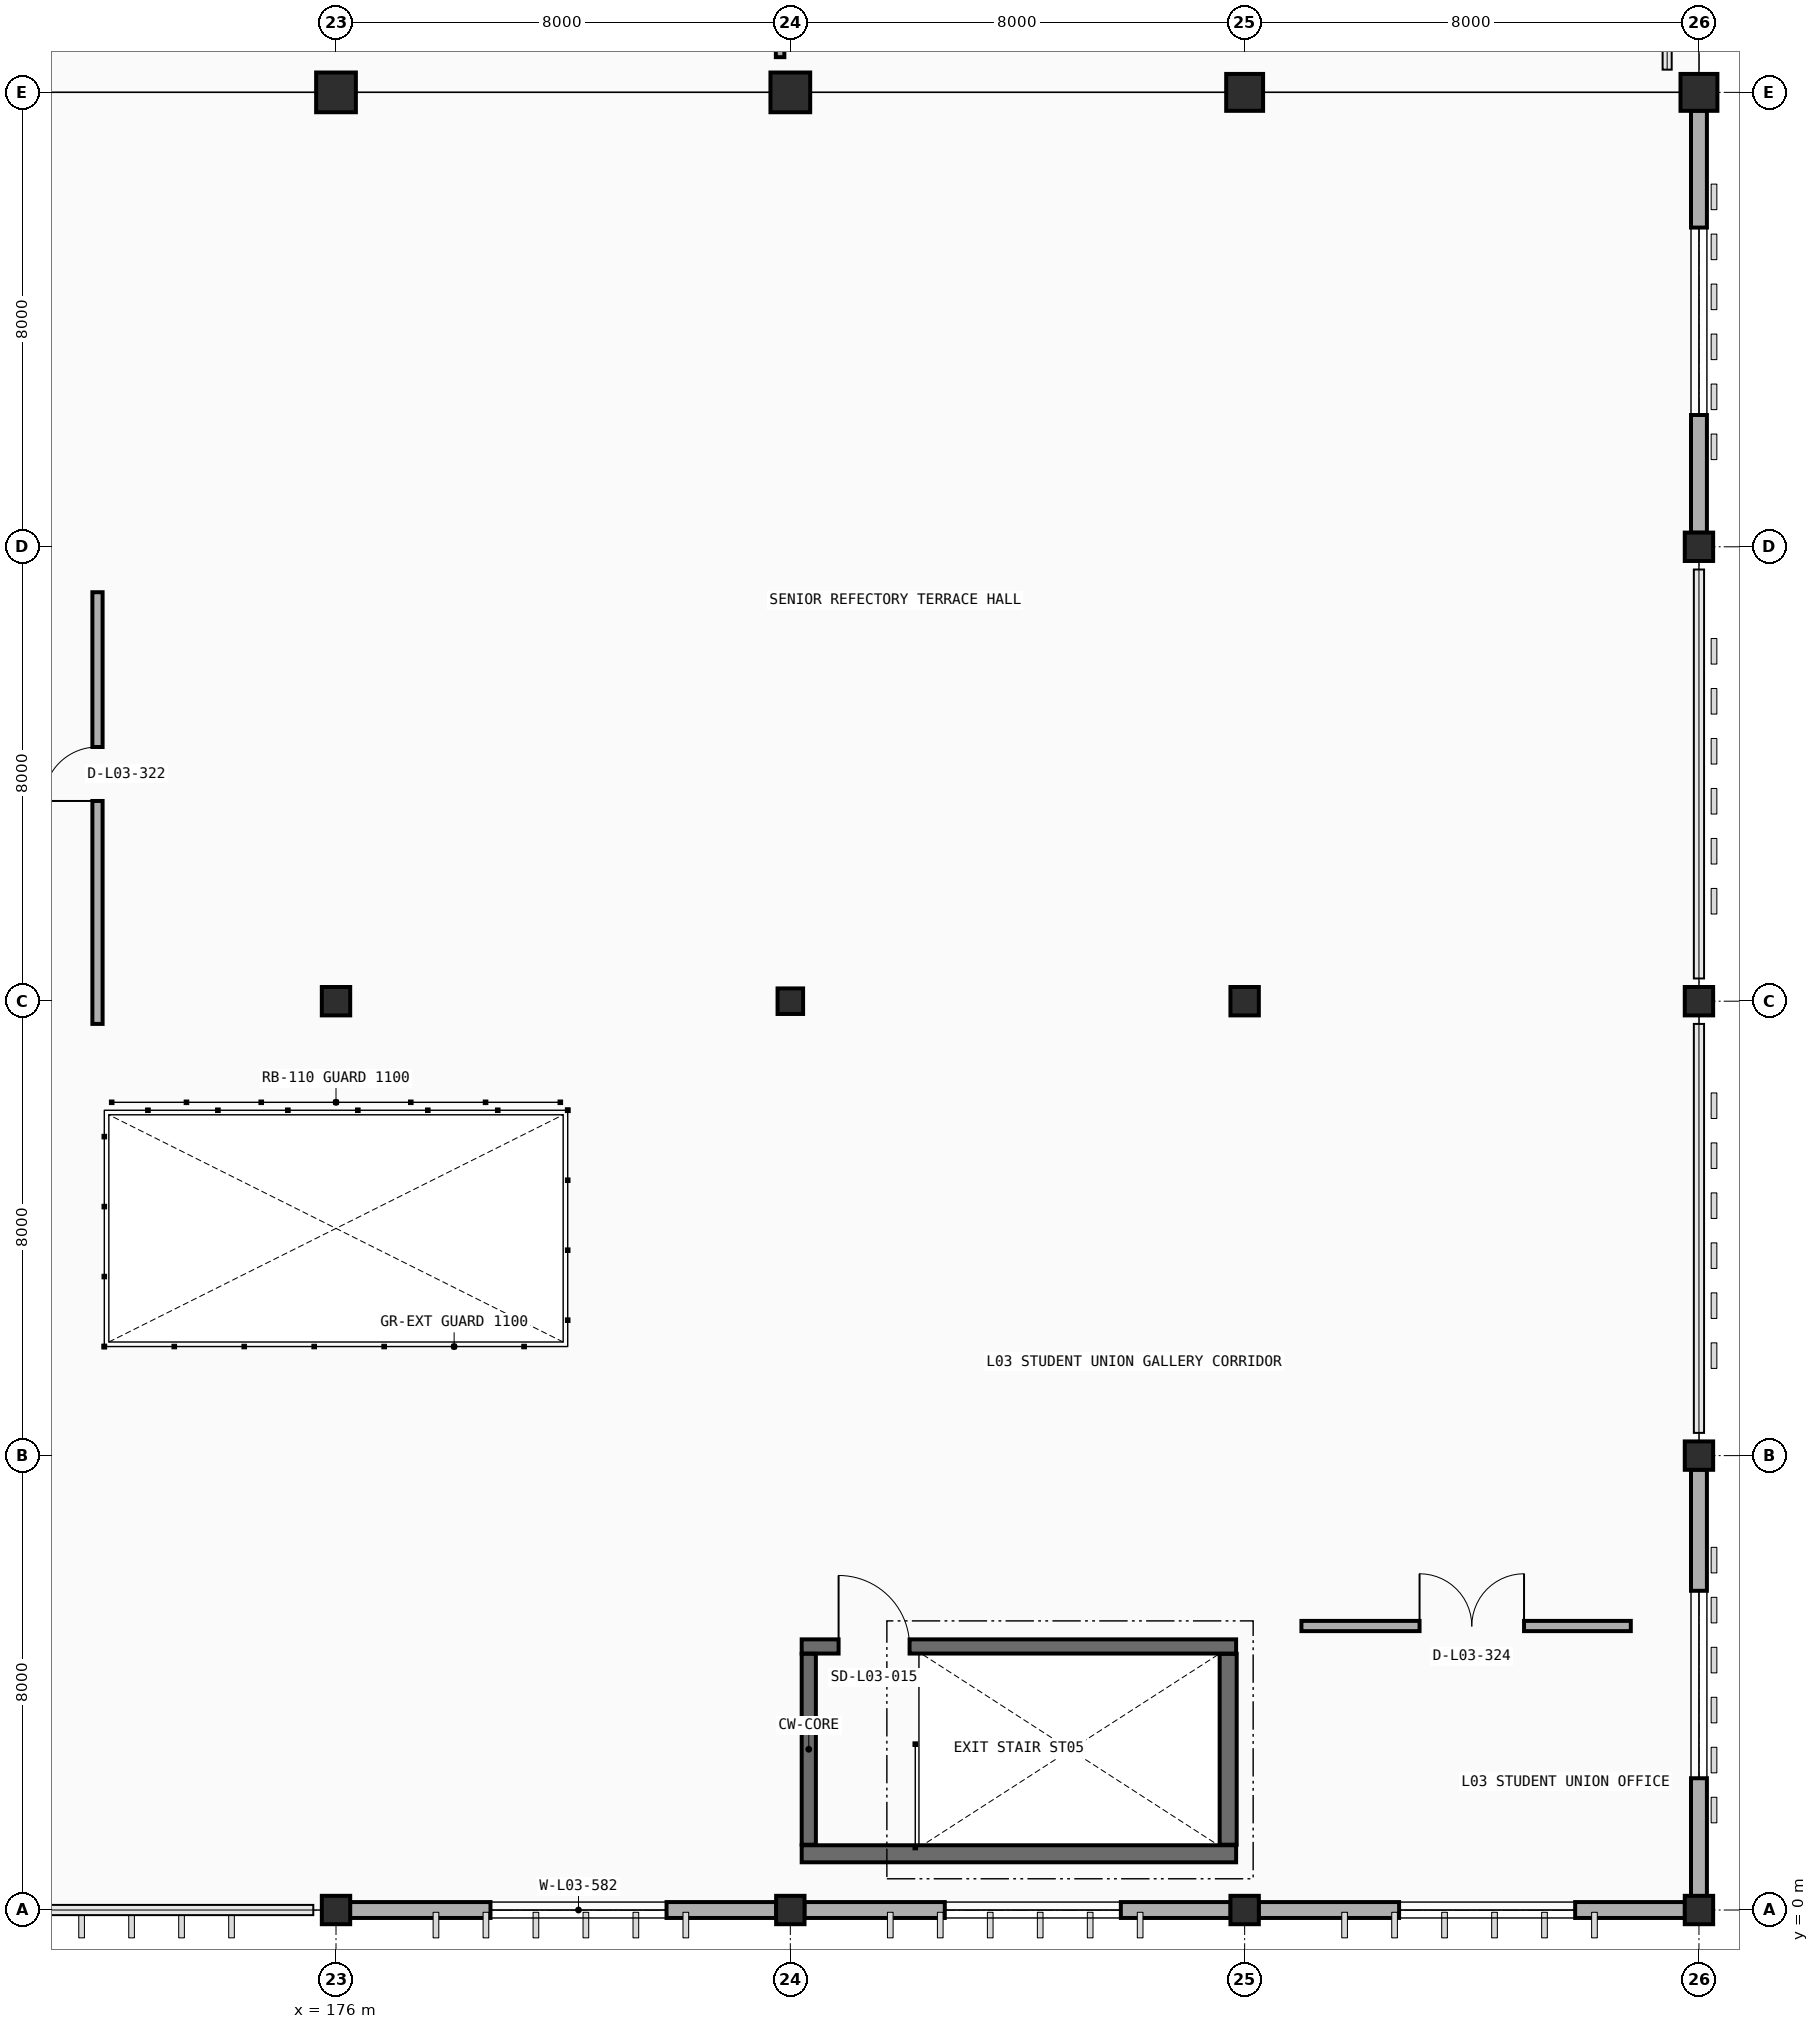
"""IFC4 building model, lengths in metres.
Left out: names, types, materials, properties, quantities, classifications, styles, units other than length and angle.
Written with IfcOpenShell. Run it as: python <this file> out.ifc"""

import sys

from ifc_helpers import new_model, si_unit, direction, frame, frame_2d, origin, origin_2d, place, context, subcontext, project, spatial, rectangle, extrude, element, fill, save


model = new_model("IFC4")
c1 = context("Model", 3, precision=1e-05, world=origin(), true_north=direction((0.0, 1.0)))
c2 = subcontext(c1, "Body", "Model", "MODEL_VIEW")
j1 = project(units=[si_unit("LENGTHUNIT", "METRE"), si_unit("PLANEANGLEUNIT", "RADIAN")], contexts=[c1])
p1 = place(None, origin())
s1 = spatial("IfcSite", under=j1, at=p1, CompositionType="ELEMENT")
p2 = place(p1, origin())
s2 = spatial("IfcBuilding", under=s1, at=p2, CompositionType="ELEMENT")
p3 = place(p2, frame((0.0, 0.0, 9.6)))
s3 = spatial("IfcBuildingStorey", under=s2, at=p3, CompositionType="ELEMENT", Elevation=9.6)
for number, where, z_axis, x_axis in (
    (1, (176.0, 0.0, 0.0), (0.0, 0.0, 1.0), (0.0, 1.0, 0.0)),
    (2, (184.0, 0.0, 0.0), (0.0, 0.0, 1.0), (0.0, 1.0, 0.0)),
    (3, (192.0, 0.0, 0.0), (0.0, 0.0, 1.0), (0.0, 1.0, 0.0)),
    (4, (200.0, 0.0, 0.0), (0.0, 0.0, 1.0), (0.0, 1.0, 0.0)),
    (5, (200.0, 8.0, 0.0), (0.0, 0.0, 1.0), (0.0, 1.0, 0.0)),
    (6, (176.0, 16.0, 0.0), (0.0, 0.0, 1.0), (1.0, 0.0, 0.0)),
):
    element("IfcColumn", number, at=place(p3, frame(where, z_axis=z_axis, x_axis=x_axis)), inside=s3, PredefinedType="COLUMN", context=c2, shape_type="SweptSolid", body=[
        extrude(rectangle(XDim=0.5, YDim=0.5, at=origin_2d()), origin(), (0.0, 0.0, 1.0), 4.2),
    ])
p4 = place(p3, frame((184.0, 16.0, 0.0), z_axis=(0.0, 0.0, 1.0), x_axis=(1.0, 0.0, 0.0)))
e7 = element("IfcColumn", 7, at=p4, inside=s3, PredefinedType="COLUMN", context=c2, shape_type="SweptSolid", body=[
    extrude(rectangle(XDim=0.45, YDim=0.45, at=origin_2d()), origin(), (0.0, 0.0, 1.0), 4.2),
])
for number, where, z_axis, x_axis in (
    (8, (192.0, 16.0, 0.0), (0.0, 0.0, 1.0), (1.0, 0.0, 0.0)),
    (9, (200.0, 16.0, 0.0), (0.0, 0.0, 1.0), (0.0, 1.0, 0.0)),
    (10, (200.0, 24.0, 0.0), (0.0, 0.0, 1.0), (0.0, 1.0, 0.0)),
):
    element("IfcColumn", number, at=place(p3, frame(where, z_axis=z_axis, x_axis=x_axis)), inside=s3, PredefinedType="COLUMN", context=c2, shape_type="SweptSolid", body=[
        extrude(rectangle(XDim=0.5, YDim=0.5, at=origin_2d()), origin(), (0.0, 0.0, 1.0), 4.2),
    ])
for number, where, z_axis, x_axis in (
    (11, (176.0, 32.0, 0.0), (0.0, 0.0, 1.0), (1.0, 0.0, 0.0)),
    (12, (184.0, 32.0, 0.0), (0.0, 0.0, 1.0), (1.0, 0.0, 0.0)),
):
    element("IfcColumn", number, at=place(p3, frame(where, z_axis=z_axis, x_axis=x_axis)), inside=s3, PredefinedType="COLUMN", context=c2, shape_type="SweptSolid", body=[
        extrude(rectangle(XDim=0.7, YDim=0.7, at=origin_2d()), origin(), (0.0, 0.0, 1.0), 4.2),
    ])
for number, where, z_axis, x_axis in (
    (13, (192.0, 32.0, 0.0), (0.0, 0.0, 1.0), (1.0, 0.0, 0.0)),
    (14, (200.0, 32.0, 0.0), (0.0, 0.0, 1.0), (1.0, 0.0, 0.0)),
):
    element("IfcColumn", number, at=place(p3, frame(where, z_axis=z_axis, x_axis=x_axis)), inside=s3, PredefinedType="COLUMN", context=c2, shape_type="SweptSolid", body=[
        extrude(rectangle(XDim=0.65, YDim=0.65, at=origin_2d()), origin(), (0.0, 0.0, 1.0), 4.2),
    ])
p5 = place(p3, frame((199.76, 32.22, 0.0), z_axis=(0.0, 0.0, 1.0), x_axis=(-1.0, 0.0, 0.0)))
e15 = element("IfcWall", 15, at=p5, inside=s3, PredefinedType="PARAPET", context=c2, shape_type="SweptSolid", body=[
    extrude(rectangle(XDim=0.32, YDim=0.2, at=frame_2d((0.16, 0.0))), origin(), (0.0, 0.0, 1.0), 3.35),
])
p6 = place(p3, frame((183.753, 0.0, 0.0), z_axis=(0.0, 0.0, 1.0), x_axis=(-1.0, 0.0, 0.0)))
e16 = element("IfcWall", 16, at=p6, inside=s3, PredefinedType="STANDARD", context=c2, shape_type="SweptSolid", body=[
    extrude(rectangle(XDim=7.506, YDim=0.28, at=frame_2d((3.753, 0.0))), origin(), (0.0, 0.0, 1.0), 3.35),
])
p7 = place(p6, frame((1.933, 0.0, 0.9)))
e17 = element("IfcOpeningElement", 17, at=p7, cuts=e16, PredefinedType="OPENING", context=c2, shape_type="SweptSolid", body=[
    extrude(rectangle(XDim=3.1, YDim=1.6, at=frame_2d((1.55, 0.8))), frame((0.0, 0.15, 0.0), z_axis=(0.0, -1.0, 0.0), x_axis=(1.0, 0.0, 0.0)), (0.0, 0.0, 1.0), 0.3),
])
p8 = place(p3, frame((191.753, 0.0, 0.0), z_axis=(0.0, 0.0, 1.0), x_axis=(-1.0, 0.0, 0.0)))
e18 = element("IfcWall", 18, at=p8, inside=s3, PredefinedType="STANDARD", context=c2, shape_type="SweptSolid", body=[
    extrude(rectangle(XDim=7.506, YDim=0.28, at=frame_2d((3.753, 0.0))), origin(), (0.0, 0.0, 1.0), 3.35),
])
p9 = place(p8, frame((1.933, 0.0, 0.9)))
e19 = element("IfcOpeningElement", 19, at=p9, cuts=e18, PredefinedType="OPENING", context=c2, shape_type="SweptSolid", body=[
    extrude(rectangle(XDim=3.1, YDim=1.6, at=frame_2d((1.55, 0.8))), frame((0.0, 0.15, 0.0), z_axis=(0.0, -1.0, 0.0), x_axis=(1.0, 0.0, 0.0)), (0.0, 0.0, 1.0), 0.3),
])
p10 = place(p3, frame((199.753, 0.0, 0.0), z_axis=(0.0, 0.0, 1.0), x_axis=(-1.0, 0.0, 0.0)))
e20 = element("IfcWall", 20, at=p10, inside=s3, PredefinedType="STANDARD", context=c2, shape_type="SweptSolid", body=[
    extrude(rectangle(XDim=7.506, YDim=0.28, at=frame_2d((3.753, 0.0))), origin(), (0.0, 0.0, 1.0), 3.35),
])
p11 = place(p10, frame((1.933, 0.0, 0.9)))
e21 = element("IfcOpeningElement", 21, at=p11, cuts=e20, PredefinedType="OPENING", context=c2, shape_type="SweptSolid", body=[
    extrude(rectangle(XDim=3.1, YDim=1.6, at=frame_2d((1.55, 0.8))), frame((0.0, 0.15, 0.0), z_axis=(0.0, -1.0, 0.0), x_axis=(1.0, 0.0, 0.0)), (0.0, 0.0, 1.0), 0.3),
])
p12 = place(p3, frame((200.0, 7.753, 0.0), z_axis=(0.0, 0.0, 1.0), x_axis=(0.0, -1.0, 0.0)))
e22 = element("IfcWall", 22, at=p12, inside=s3, PredefinedType="STANDARD", context=c2, shape_type="SweptSolid", body=[
    extrude(rectangle(XDim=7.506, YDim=0.28, at=frame_2d((3.753, 0.0))), origin(), (0.0, 0.0, 1.0), 3.35),
])
p13 = place(p12, frame((2.133, 0.0, 0.95)))
e23 = element("IfcOpeningElement", 23, at=p13, cuts=e22, PredefinedType="OPENING", context=c2, shape_type="SweptSolid", body=[
    extrude(rectangle(XDim=3.3, YDim=1.75, at=frame_2d((1.65, 0.875))), frame((0.0, 0.15, 0.0), z_axis=(0.0, -1.0, 0.0), x_axis=(1.0, 0.0, 0.0)), (0.0, 0.0, 1.0), 0.3),
])
p14 = place(p3, frame((200.0, 31.678, 0.0), z_axis=(0.0, 0.0, 1.0), x_axis=(0.0, -1.0, 0.0)))
e24 = element("IfcWall", 24, at=p14, inside=s3, PredefinedType="STANDARD", context=c2, shape_type="SweptSolid", body=[
    extrude(rectangle(XDim=7.431, YDim=0.28, at=frame_2d((3.715, 0.0))), origin(), (0.0, 0.0, 1.0), 3.35),
])
p15 = place(p14, frame((2.058, 0.0, 0.95)))
e25 = element("IfcOpeningElement", 25, at=p15, cuts=e24, PredefinedType="OPENING", context=c2, shape_type="SweptSolid", body=[
    extrude(rectangle(XDim=3.3, YDim=1.75, at=frame_2d((1.65, 0.875))), frame((0.0, 0.15, 0.0), z_axis=(0.0, -1.0, 0.0), x_axis=(1.0, 0.0, 0.0)), (0.0, 0.0, 1.0), 0.3),
])
p16 = place(p3, frame((184.2, 0.99, 0.0), z_axis=(0.0, 0.0, 1.0), x_axis=(1.0, 0.0, 0.0)))
e26 = element("IfcWall", 26, at=p16, inside=s3, PredefinedType="SHEAR", context=c2, shape_type="SweptSolid", body=[
    extrude(rectangle(XDim=7.65, YDim=0.3, at=frame_2d((3.825, 0.0))), origin(), (0.0, 0.0, 1.0), 4.2),
])
p17 = place(p3, frame((191.71, 1.15, 0.0), z_axis=(0.0, 0.0, 1.0), x_axis=(0.0, 1.0, 0.0)))
e27 = element("IfcWall", 27, at=p17, inside=s3, PredefinedType="SHEAR", context=c2, shape_type="SweptSolid", body=[
    extrude(rectangle(XDim=3.36, YDim=0.3, at=frame_2d((1.68, 0.0))), origin(), (0.0, 0.0, 1.0), 4.2),
])
p18 = place(p3, frame((184.2, 4.64, 0.0), z_axis=(0.0, 0.0, 1.0), x_axis=(1.0, 0.0, 0.0)))
e28 = element("IfcWall", 28, at=p18, inside=s3, PredefinedType="SOLIDWALL", context=c2, shape_type="SweptSolid", body=[
    extrude(rectangle(XDim=7.65, YDim=0.25, at=frame_2d((3.825, 0.0))), origin(), (0.0, 0.0, 1.0), 4.2),
])
p19 = place(p18, frame((0.65, 0.0, 0.0)))
e29 = element("IfcOpeningElement", 29, at=p19, cuts=e28, PredefinedType="OPENING", context=c2, shape_type="SweptSolid", body=[
    extrude(rectangle(XDim=1.25, YDim=2.15, at=frame_2d((0.625, 1.075))), frame((0.0, 0.135, 0.0), z_axis=(0.0, -1.0, 0.0), x_axis=(1.0, 0.0, 0.0)), (0.0, 0.0, 1.0), 0.27),
])
p20 = place(p3, frame((184.325, 1.15, 0.0), z_axis=(0.0, 0.0, 1.0), x_axis=(0.0, 1.0, 0.0)))
e30 = element("IfcWall", 30, at=p20, inside=s3, PredefinedType="SOLIDWALL", context=c2, shape_type="SweptSolid", body=[
    extrude(rectangle(XDim=3.36, YDim=0.25, at=frame_2d((1.68, 0.0))), origin(), (0.0, 0.0, 1.0), 4.2),
])
p21 = place(p3, frame((183.82, 32.62, 0.0), z_axis=(0.0, 0.0, 1.0), x_axis=(0.0, 1.0, 0.0)))
e31 = element("IfcWall", 31, at=p21, inside=s3, PredefinedType="PARTITIONING", context=c2, shape_type="SweptSolid", body=[
    extrude(rectangle(XDim=6.81, YDim=0.15, at=frame_2d((3.405, 0.0))), origin(), (0.0, 0.0, 1.0), 3.225),
])
p22 = place(p3, frame((171.8, 15.6, 0.0), z_axis=(0.0, 0.0, 1.0), x_axis=(0.0, 1.0, 0.0)))
e32 = element("IfcWall", 32, at=p22, inside=s3, PredefinedType="PARTITIONING", context=c2, shape_type="SweptSolid", body=[
    extrude(rectangle(XDim=7.6, YDim=0.18, at=frame_2d((3.8, 0.0))), origin(), (0.0, 0.0, 1.0), 3.3),
])
p23 = place(p22, frame((3.925, 0.0, 0.0)))
e33 = element("IfcOpeningElement", 33, at=p23, cuts=e32, PredefinedType="OPENING", context=c2, shape_type="SweptSolid", body=[
    extrude(rectangle(XDim=0.95, YDim=2.1, at=frame_2d((0.475, 1.05))), frame((0.0, 0.1, 0.0), z_axis=(0.0, -1.0, 0.0), x_axis=(1.0, 0.0, 0.0)), (0.0, 0.0, 1.0), 0.2),
])
p24 = place(p3, frame((193.0, 5.0, 0.0), z_axis=(0.0, 0.0, 1.0), x_axis=(1.0, 0.0, 0.0)))
e34 = element("IfcWall", 34, at=p24, inside=s3, PredefinedType="PARTITIONING", context=c2, shape_type="SweptSolid", body=[
    extrude(rectangle(XDim=5.8, YDim=0.18, at=frame_2d((2.9, 0.0))), origin(), (0.0, 0.0, 1.0), 3.3),
])
p25 = place(p24, frame((2.08, 0.0, 0.0)))
e35 = element("IfcOpeningElement", 35, at=p25, cuts=e34, PredefinedType="OPENING", context=c2, shape_type="SweptSolid", body=[
    extrude(rectangle(XDim=1.84, YDim=2.25, at=frame_2d((0.92, 1.125))), frame((0.0, 0.1, 0.0), z_axis=(0.0, -1.0, 0.0), x_axis=(1.0, 0.0, 0.0)), (0.0, 0.0, 1.0), 0.2),
])
p26 = place(p7, origin())
e36 = element("IfcWindow", 36, at=p26, inside=s3, PartitioningType="DOUBLE_PANEL_VERTICAL", PredefinedType="WINDOW", context=c2, shape_type="SweptSolid", body=[
    extrude(rectangle(XDim=3.1, YDim=1.6, at=frame_2d((1.55, 0.8))), frame((0.0, 0.03, 0.0), z_axis=(0.0, -1.0, 0.0), x_axis=(1.0, 0.0, 0.0)), (0.0, 0.0, 1.0), 0.06),
])
fill(e17, e36)
p27 = place(p9, origin())
e37 = element("IfcWindow", 37, at=p27, inside=s3, PartitioningType="DOUBLE_PANEL_VERTICAL", PredefinedType="WINDOW", context=c2, shape_type="SweptSolid", body=[
    extrude(rectangle(XDim=3.1, YDim=1.6, at=frame_2d((1.55, 0.8))), frame((0.0, 0.03, 0.0), z_axis=(0.0, -1.0, 0.0), x_axis=(1.0, 0.0, 0.0)), (0.0, 0.0, 1.0), 0.06),
])
fill(e19, e37)
p28 = place(p11, origin())
e38 = element("IfcWindow", 38, at=p28, inside=s3, PartitioningType="DOUBLE_PANEL_VERTICAL", PredefinedType="WINDOW", context=c2, shape_type="SweptSolid", body=[
    extrude(rectangle(XDim=3.1, YDim=1.6, at=frame_2d((1.55, 0.8))), frame((0.0, 0.03, 0.0), z_axis=(0.0, -1.0, 0.0), x_axis=(1.0, 0.0, 0.0)), (0.0, 0.0, 1.0), 0.06),
])
fill(e21, e38)
p29 = place(p13, origin())
e39 = element("IfcWindow", 39, at=p29, inside=s3, PartitioningType="DOUBLE_PANEL_VERTICAL", PredefinedType="WINDOW", context=c2, shape_type="SweptSolid", body=[
    extrude(rectangle(XDim=3.3, YDim=1.75, at=frame_2d((1.65, 0.875))), frame((0.0, 0.03, 0.0), z_axis=(0.0, -1.0, 0.0), x_axis=(1.0, 0.0, 0.0)), (0.0, 0.0, 1.0), 0.06),
])
fill(e23, e39)
p30 = place(p15, origin())
e40 = element("IfcWindow", 40, at=p30, inside=s3, PartitioningType="DOUBLE_PANEL_VERTICAL", PredefinedType="WINDOW", context=c2, shape_type="SweptSolid", body=[
    extrude(rectangle(XDim=3.3, YDim=1.75, at=frame_2d((1.65, 0.875))), frame((0.0, 0.03, 0.0), z_axis=(0.0, -1.0, 0.0), x_axis=(1.0, 0.0, 0.0)), (0.0, 0.0, 1.0), 0.06),
])
fill(e25, e40)
p31 = place(p19, origin())
e41 = element("IfcDoor", 41, at=p31, inside=s3, OperationType="SINGLE_SWING_LEFT", PredefinedType="DOOR", context=c2, shape_type="SweptSolid", body=[
    extrude(rectangle(XDim=1.25, YDim=2.15, at=frame_2d((0.625, 1.075))), frame((0.0, 0.025, 0.0), z_axis=(0.0, -1.0, 0.0), x_axis=(1.0, 0.0, 0.0)), (0.0, 0.0, 1.0), 0.05),
])
fill(e29, e41)
p32 = place(p23, origin())
e42 = element("IfcDoor", 42, at=p32, inside=s3, OperationType="SINGLE_SWING_LEFT", PredefinedType="DOOR", context=c2, shape_type="SweptSolid", body=[
    extrude(rectangle(XDim=0.95, YDim=2.1, at=frame_2d((0.475, 1.05))), frame((0.0, 0.025, 0.0), z_axis=(0.0, -1.0, 0.0), x_axis=(1.0, 0.0, 0.0)), (0.0, 0.0, 1.0), 0.05),
])
fill(e33, e42)
p33 = place(p25, origin())
e43 = element("IfcDoor", 43, at=p33, inside=s3, OperationType="DOUBLE_DOOR_SINGLE_SWING", PredefinedType="DOOR", context=c2, shape_type="SweptSolid", body=[
    extrude(rectangle(XDim=1.84, YDim=2.25, at=frame_2d((0.92, 1.125))), frame((0.0, 0.025, 0.0), z_axis=(0.0, -1.0, 0.0), x_axis=(1.0, 0.0, 0.0)), (0.0, 0.0, 1.0), 0.05),
])
fill(e35, e43)
save(model, sys.argv[1])
